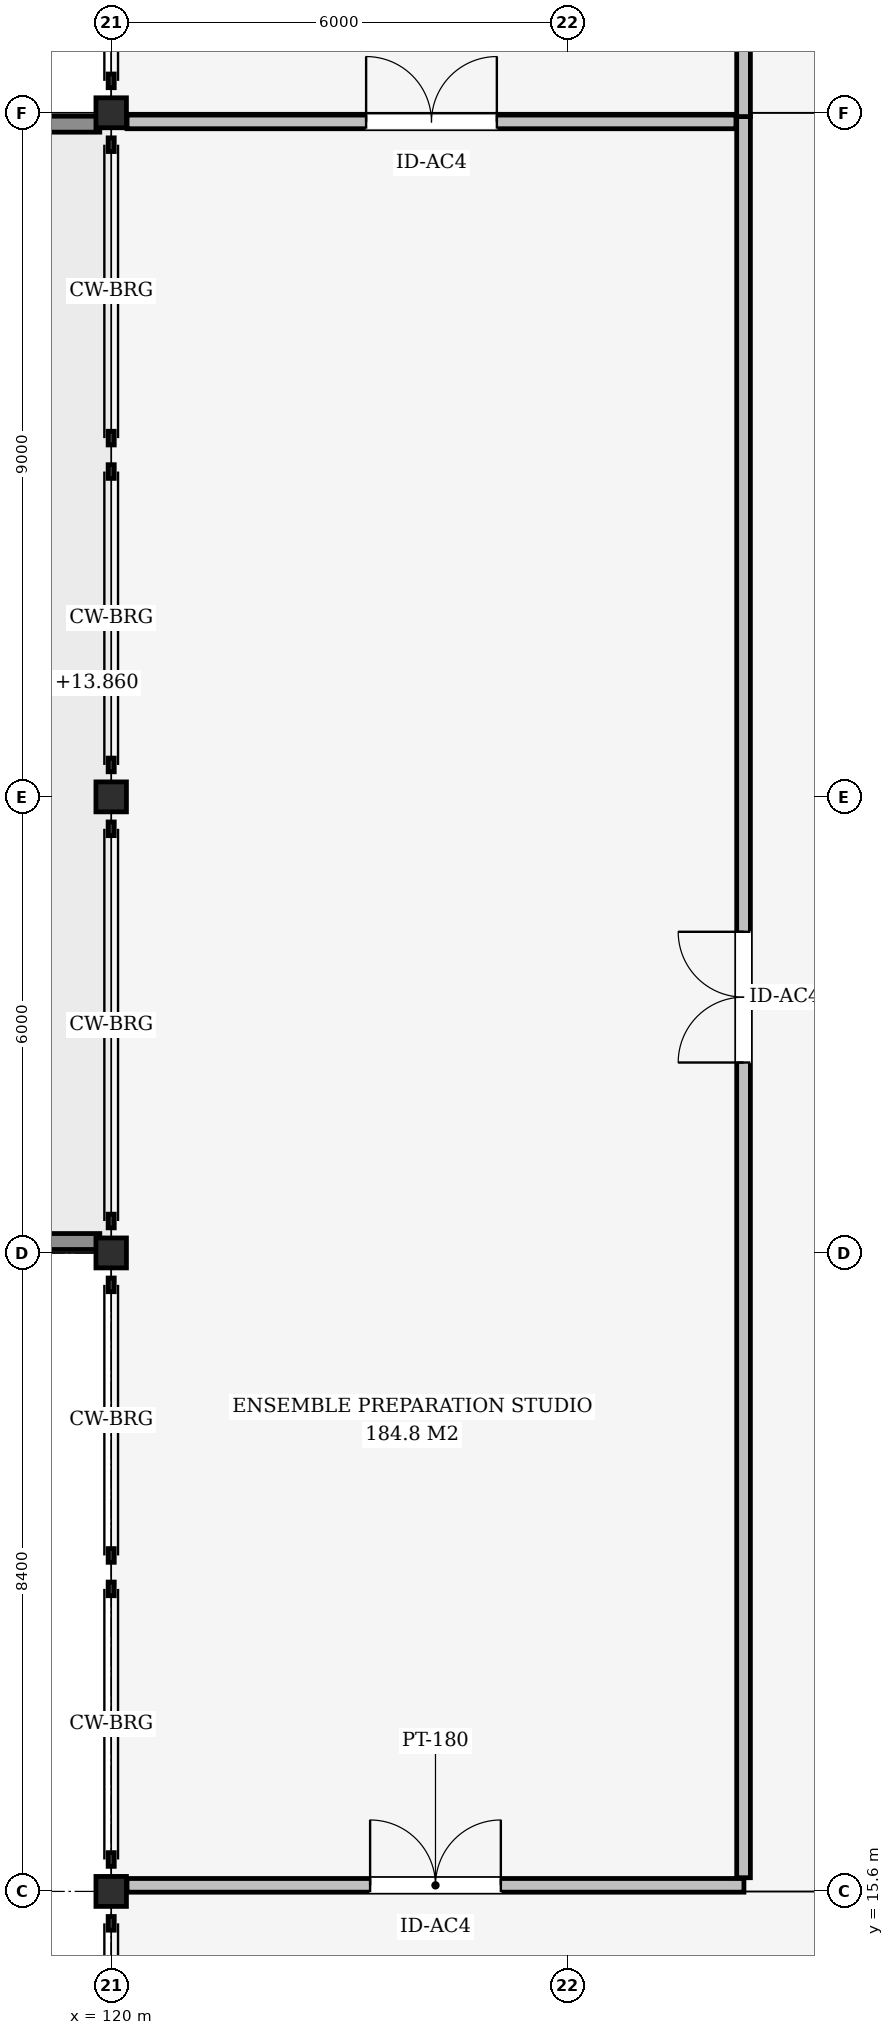
"""IFC4 building model, lengths in metres.
Left out: names, types, materials, properties, quantities, classifications, styles, units other than length and angle.
Written with IfcOpenShell. Run it as: python <this file> out.ifc"""

import sys

from ifc_helpers import new_model, si_unit, direction, frame, frame_2d, origin, origin_2d, place, context, subcontext, project, spatial, rectangle, i_section, extrude, element, fill, save


model = new_model("IFC4")
c1 = context("Model", 3, precision=1e-05, world=origin(), true_north=direction((0.0, 1.0)))
c2 = subcontext(c1, "Body", "Model", "MODEL_VIEW")
j1 = project(units=[si_unit("LENGTHUNIT", "METRE"), si_unit("PLANEANGLEUNIT", "RADIAN")], contexts=[c1])
p1 = place(None, origin())
s1 = spatial("IfcSite", under=j1, at=p1, CompositionType="ELEMENT")
p2 = place(p1, origin())
s2 = spatial("IfcBuilding", under=s1, at=p2, CompositionType="ELEMENT")
p3 = place(p2, frame((0.0, 0.0, 13.8)))
s3 = spatial("IfcBuildingStorey", under=s2, at=p3, CompositionType="ELEMENT", Elevation=13.8)
for number, where, z_axis, x_axis in (
    (1, (120.0, 15.6, 0.0), (0.0, 0.0, 1.0), (1.0, 0.0, 0.0)),
    (2, (120.0, 24.0, 0.0), (0.0, 0.0, 1.0), (1.0, 0.0, 0.0)),
    (3, (120.0, 30.0, 0.0), (0.0, 0.0, 1.0), (1.0, 0.0, 0.0)),
    (4, (120.0, 39.0, 0.0), (0.0, 0.0, 1.0), (1.0, 0.0, 0.0)),
):
    element("IfcColumn", number, at=place(p3, frame(where, z_axis=z_axis, x_axis=x_axis)), inside=s3, PredefinedType="COLUMN", context=c2, shape_type="SweptSolid", body=[
        extrude(i_section(OverallWidth=0.401, OverallDepth=0.394, WebThickness=0.023, FlangeThickness=0.037, at=origin_2d()), origin(), (0.0, 0.0, 1.0), 4.22),
    ])
p4 = place(p3, frame((83.85, 24.15, 0.06), z_axis=(0.0, 0.0, 1.0), x_axis=(1.0, 0.0, 0.0)))
e5 = element("IfcWall", 5, at=p4, inside=s3, PredefinedType="PARAPET", context=c2, shape_type="SweptSolid", body=[
    extrude(rectangle(XDim=36.0, YDim=0.21, at=frame_2d((18.0, 0.0))), origin(), (0.0, 0.0, 1.0), 0.72),
])
p5 = place(p3, frame((48.15, 38.85, 0.06), z_axis=(0.0, 0.0, 1.0), x_axis=(1.0, 0.0, 0.0)))
e6 = element("IfcWall", 6, at=p5, inside=s3, PredefinedType="PARAPET", context=c2, shape_type="SweptSolid", body=[
    extrude(rectangle(XDim=71.7, YDim=0.21, at=frame_2d((35.85, 0.0))), origin(), (0.0, 0.0, 1.0), 0.72),
])
p6 = place(p3, frame((120.208, 15.68, 0.0), z_axis=(0.0, 0.0, 1.0), x_axis=(1.0, 0.0, 0.0)))
e7 = element("IfcWall", 7, at=p6, inside=s3, PredefinedType="PARTITIONING", context=c2, shape_type="SweptSolid", body=[
    extrude(rectangle(XDim=8.116, YDim=0.18, at=frame_2d((4.058, 0.0))), origin(), (0.0, 0.0, 1.0), 3.438),
])
p7 = place(p6, frame((3.198, 0.0, 0.0)))
e8 = element("IfcOpeningElement", 8, at=p7, cuts=e7, PredefinedType="OPENING", context=c2, shape_type="SweptSolid", body=[
    extrude(rectangle(XDim=1.72, YDim=2.34, at=frame_2d((0.86, 1.17))), frame((0.0, 0.1, 0.0), z_axis=(0.0, -1.0, 0.0), x_axis=(1.0, 0.0, 0.0)), (0.0, 0.0, 1.0), 0.2),
])
p8 = place(p3, frame((128.32, 15.78, 0.0), z_axis=(0.0, 0.0, 1.0), x_axis=(0.0, 1.0, 0.0)))
e9 = element("IfcWall", 9, at=p8, inside=s3, PredefinedType="PARTITIONING", context=c2, shape_type="SweptSolid", body=[
    extrude(rectangle(XDim=23.17, YDim=0.18, at=frame_2d((11.585, 0.0))), origin(), (0.0, 0.0, 1.0), 4.24),
])
p9 = place(p8, frame((10.725, 0.0, 0.0)))
e10 = element("IfcOpeningElement", 10, at=p9, cuts=e9, PredefinedType="OPENING", context=c2, shape_type="SweptSolid", body=[
    extrude(rectangle(XDim=1.72, YDim=2.34, at=frame_2d((0.86, 1.17))), frame((0.0, 0.1, 0.0), z_axis=(0.0, -1.0, 0.0), x_axis=(1.0, 0.0, 0.0)), (0.0, 0.0, 1.0), 0.2),
])
p10 = place(p3, frame((128.32, 38.95, 0.0), z_axis=(0.0, 0.0, 1.0), x_axis=(0.0, 1.0, 0.0)))
e11 = element("IfcWall", 11, at=p10, inside=s3, PredefinedType="PARTITIONING", context=c2, shape_type="SweptSolid", body=[
    extrude(rectangle(XDim=34.8, YDim=0.18, at=frame_2d((17.4, 0.0))), origin(), (0.0, 0.0, 1.0), 4.2),
])
p11 = place(p10, frame((16.54, 0.0, 0.0)))
e12 = element("IfcOpeningElement", 12, at=p11, cuts=e11, PredefinedType="OPENING", context=c2, shape_type="SweptSolid", body=[
    extrude(rectangle(XDim=1.72, YDim=2.34, at=frame_2d((0.86, 1.17))), frame((0.0, 0.1, 0.0), z_axis=(0.0, -1.0, 0.0), x_axis=(1.0, 0.0, 0.0)), (0.0, 0.0, 1.0), 0.2),
])
p12 = place(p3, frame((120.208, 38.88, 0.0), z_axis=(0.0, 0.0, 1.0), x_axis=(1.0, 0.0, 0.0)))
e13 = element("IfcWall", 13, at=p12, inside=s3, PredefinedType="PARTITIONING", context=c2, shape_type="SweptSolid", body=[
    extrude(rectangle(XDim=8.011, YDim=0.18, at=frame_2d((4.006, 0.0))), origin(), (0.0, 0.0, 1.0), 3.438),
])
p13 = place(p12, frame((3.146, 0.0, 0.0)))
e14 = element("IfcOpeningElement", 14, at=p13, cuts=e13, PredefinedType="OPENING", context=c2, shape_type="SweptSolid", body=[
    extrude(rectangle(XDim=1.72, YDim=2.34, at=frame_2d((0.86, 1.17))), frame((0.0, 0.1, 0.0), z_axis=(0.0, -1.0, 0.0), x_axis=(1.0, 0.0, 0.0)), (0.0, 0.0, 1.0), 0.2),
])
p14 = place(p7, origin())
e15 = element("IfcDoor", 15, at=p14, inside=s3, OperationType="DOUBLE_DOOR_SINGLE_SWING", PredefinedType="DOOR", context=c2, shape_type="SweptSolid", body=[
    extrude(rectangle(XDim=1.72, YDim=2.34, at=frame_2d((0.86, 1.17))), frame((0.0, 0.025, 0.0), z_axis=(0.0, -1.0, 0.0), x_axis=(1.0, 0.0, 0.0)), (0.0, 0.0, 1.0), 0.05),
])
fill(e8, e15)
p15 = place(p9, origin())
e16 = element("IfcDoor", 16, at=p15, inside=s3, OperationType="DOUBLE_DOOR_SINGLE_SWING", PredefinedType="DOOR", context=c2, shape_type="SweptSolid", body=[
    extrude(rectangle(XDim=1.72, YDim=2.34, at=frame_2d((0.86, 1.17))), frame((0.0, 0.025, 0.0), z_axis=(0.0, -1.0, 0.0), x_axis=(1.0, 0.0, 0.0)), (0.0, 0.0, 1.0), 0.05),
])
fill(e10, e16)
p16 = place(p13, origin())
e17 = element("IfcDoor", 17, at=p16, inside=s3, OperationType="DOUBLE_DOOR_SINGLE_SWING", PredefinedType="DOOR", context=c2, shape_type="SweptSolid", body=[
    extrude(rectangle(XDim=1.72, YDim=2.34, at=frame_2d((0.86, 1.17))), frame((0.0, 0.025, 0.0), z_axis=(0.0, -1.0, 0.0), x_axis=(1.0, 0.0, 0.0)), (0.0, 0.0, 1.0), 0.05),
])
fill(e14, e17)
save(model, sys.argv[1])
